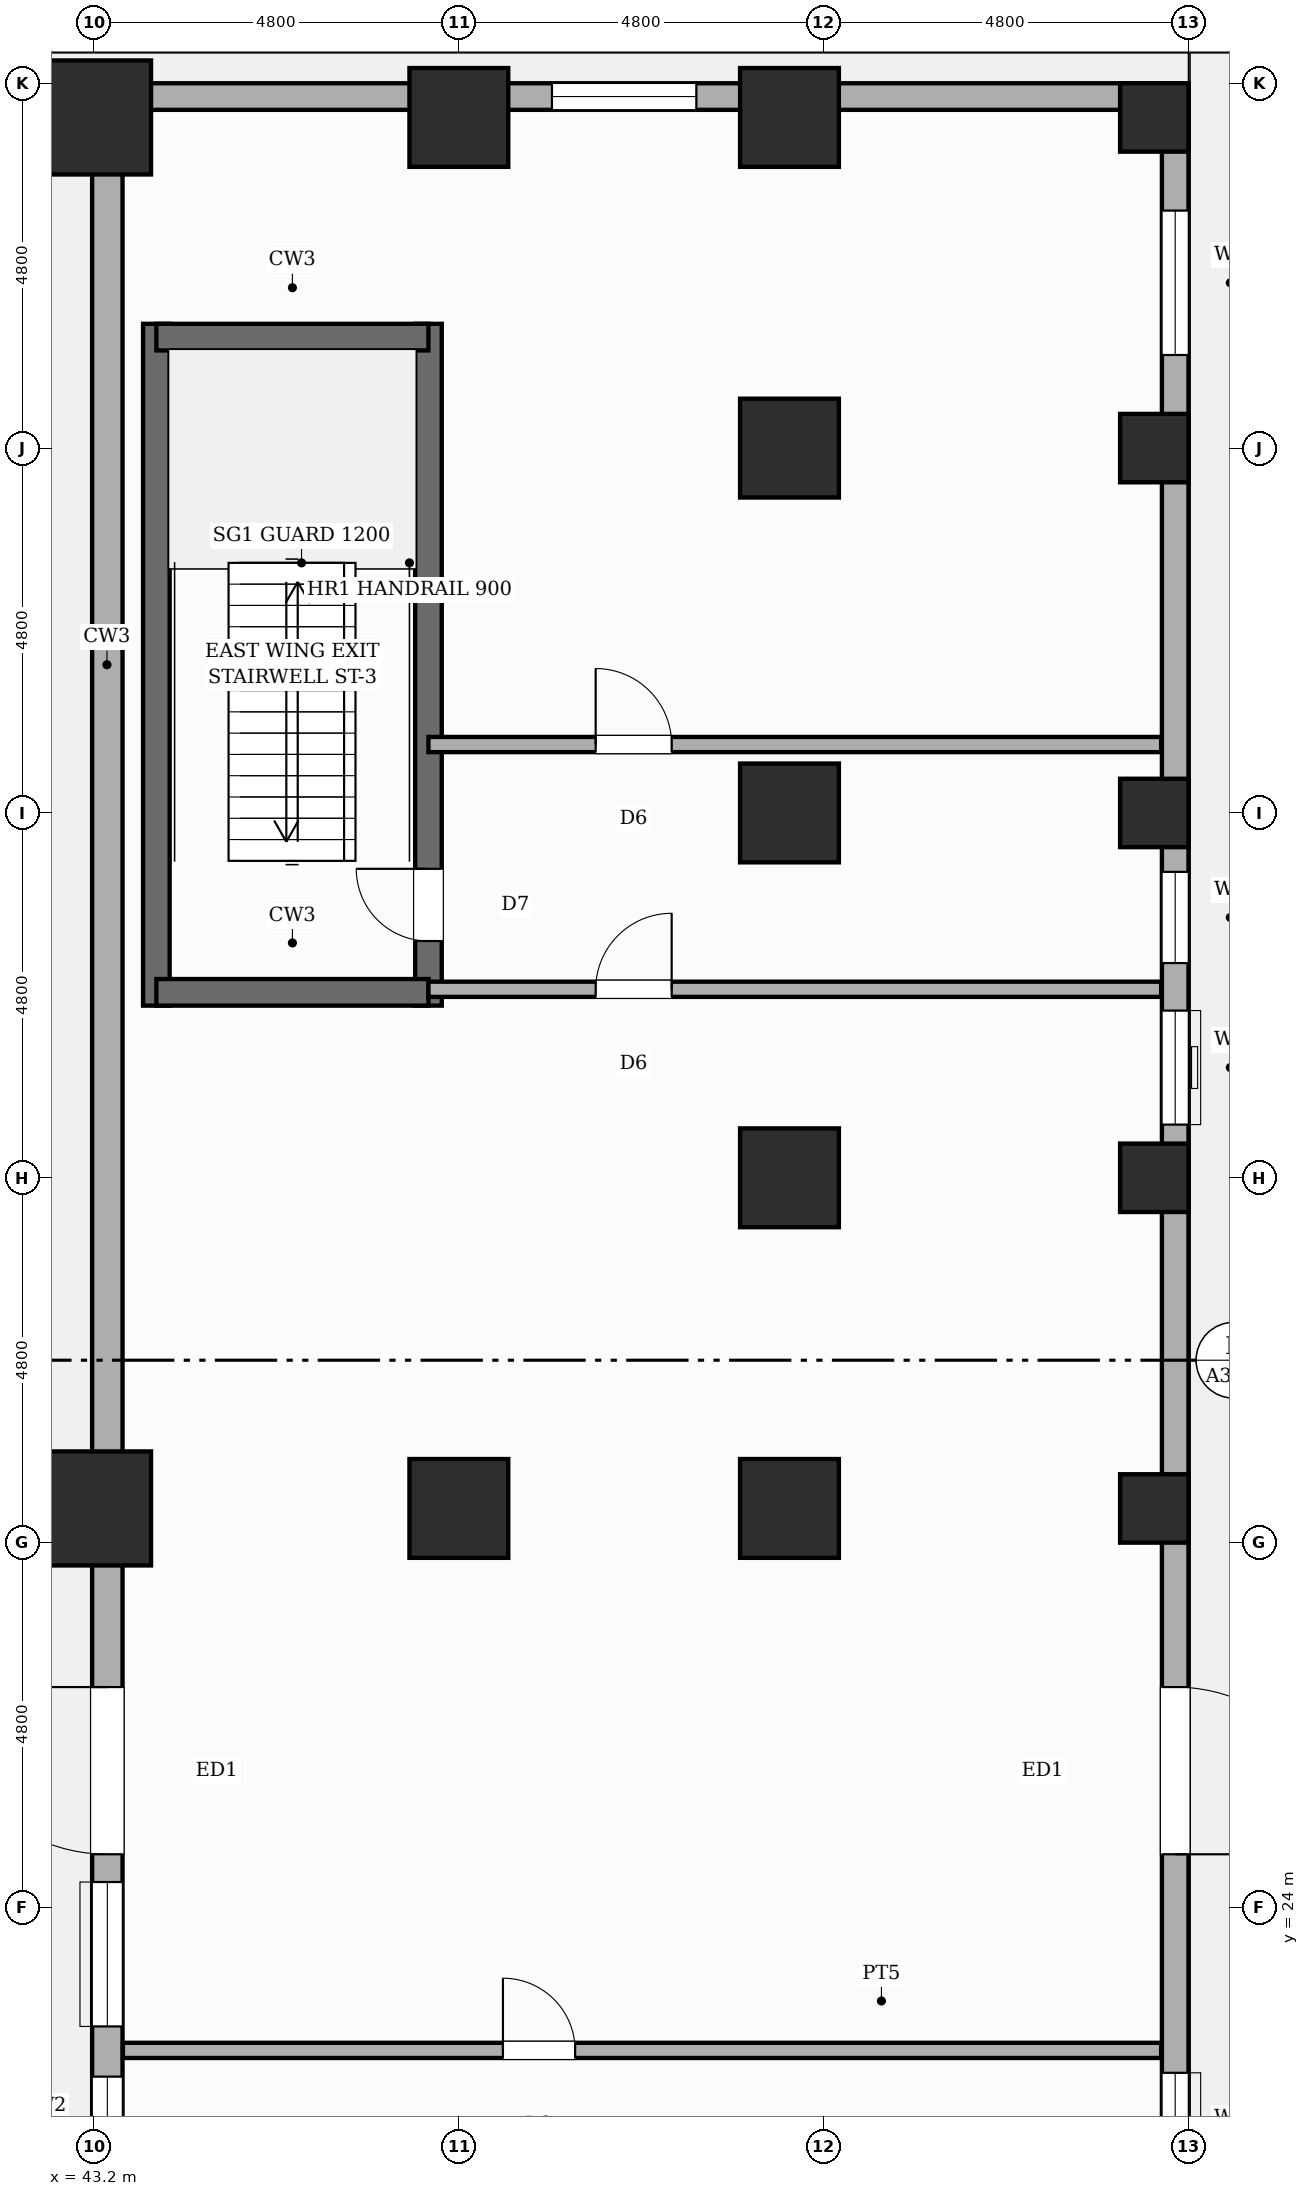
"""IFC4 building model, lengths in metres.
Left out: names, types, materials, properties, quantities, classifications, styles, units other than length and angle.
Written with IfcOpenShell. Run it as: python <this file> out.ifc"""

import sys

from ifc_helpers import new_model, si_unit, direction, frame, frame_2d, origin, origin_2d, place, context, subcontext, project, spatial, rectangle, circle, extrude, element, fill, save


model = new_model("IFC4")
c1 = context("Model", 3, precision=1e-05, world=origin(), true_north=direction((0.0, 1.0)))
c2 = subcontext(c1, "Body", "Model", "MODEL_VIEW")
j1 = project(units=[si_unit("LENGTHUNIT", "METRE"), si_unit("PLANEANGLEUNIT", "RADIAN")], contexts=[c1])
p1 = place(None, origin())
s1 = spatial("IfcSite", under=j1, at=p1, CompositionType="ELEMENT")
p2 = place(p1, origin())
s2 = spatial("IfcBuilding", under=s1, at=p2, CompositionType="ELEMENT")
p3 = place(p2, origin())
s3 = spatial("IfcBuildingStorey", under=s2, at=p3, CompositionType="ELEMENT", Elevation=0.0)
p4 = place(p3, frame((44.02, 35.865, 0.0), z_axis=(0.0, 0.0, 1.0), x_axis=(0.0, 1.0, 0.0)))
e1 = element("IfcWall", 1, at=p4, inside=s3, PredefinedType="SHEAR", context=c2, shape_type="SweptSolid", body=[
    extrude(rectangle(XDim=8.97, YDim=0.35, at=frame_2d((4.485, 0.0))), origin(), (0.0, 0.0, 1.0), 5.2),
])
p5 = place(p3, frame((47.6, 35.865, 0.0), z_axis=(0.0, 0.0, 1.0), x_axis=(0.0, 1.0, 0.0)))
e2 = element("IfcWall", 2, at=p5, inside=s3, PredefinedType="SHEAR", context=c2, shape_type="SweptSolid", body=[
    extrude(rectangle(XDim=8.97, YDim=0.35, at=frame_2d((4.485, 0.0))), origin(), (0.0, 0.0, 1.0), 5.2),
])
p6 = place(p5, frame((0.85, 0.0, 0.0)))
e3 = element("IfcOpeningElement", 3, at=p6, cuts=e2, PredefinedType="OPENING", context=c2, shape_type="SweptSolid", body=[
    extrude(rectangle(XDim=0.95, YDim=2.1, at=frame_2d((0.475, 1.05))), frame((0.0, 0.185, 0.0), z_axis=(0.0, -1.0, 0.0), x_axis=(1.0, 0.0, 0.0)), (0.0, 0.0, 1.0), 0.37),
])
for number, where, z_axis, x_axis in (
    (4, (44.02, 36.04, 0.0), (0.0, 0.0, 1.0), (1.0, 0.0, 0.0)),
    (5, (44.02, 44.66, 0.0), (0.0, 0.0, 1.0), (1.0, 0.0, 0.0)),
):
    element("IfcWall", number, at=place(p3, frame(where, z_axis=z_axis, x_axis=x_axis)), inside=s3, PredefinedType="SHEAR", context=c2, shape_type="SweptSolid", body=[
        extrude(rectangle(XDim=3.58, YDim=0.35, at=frame_2d((1.79, 0.0))), origin(), (0.0, 0.0, 1.0), 5.2),
    ])
for number, where, z_axis, x_axis in (
    (6, (43.2, 29.25, 0.0), (0.0, 0.0, 1.0), (1.0, 0.0, 0.0)),
    (7, (43.2, 47.55, 0.0), (0.0, 0.0, 1.0), (1.0, 0.0, 0.0)),
):
    element("IfcColumn", number, at=place(p3, frame(where, z_axis=z_axis, x_axis=x_axis)), inside=s3, PredefinedType="USERDEFINED", context=c2, shape_type="SweptSolid", body=[
        extrude(rectangle(XDim=1.5, YDim=1.5, at=origin_2d()), origin(), (0.0, 0.0, 1.0), 5.2),
    ])
for number, where, z_axis, x_axis in (
    (8, (48.0, 29.25, 0.0), (0.0, 0.0, 1.0), (1.0, 0.0, 0.0)),
    (9, (48.0, 47.55, 0.0), (0.0, 0.0, 1.0), (1.0, 0.0, 0.0)),
    (10, (52.35, 29.25, 0.0), (0.0, 0.0, 1.0), (1.0, 0.0, 0.0)),
    (11, (52.35, 33.6, 0.0), (0.0, 0.0, 1.0), (1.0, 0.0, 0.0)),
    (12, (52.35, 38.4, 0.0), (0.0, 0.0, 1.0), (1.0, 0.0, 0.0)),
    (13, (52.35, 43.2, 0.0), (0.0, 0.0, 1.0), (1.0, 0.0, 0.0)),
    (14, (52.35, 47.55, 0.0), (0.0, 0.0, 1.0), (1.0, 0.0, 0.0)),
):
    element("IfcColumn", number, at=place(p3, frame(where, z_axis=z_axis, x_axis=x_axis)), inside=s3, PredefinedType="COLUMN", context=c2, shape_type="SweptSolid", body=[
        extrude(rectangle(XDim=1.3, YDim=1.3, at=origin_2d()), origin(), (0.0, 0.0, 1.0), 5.2),
    ])
for number, where, z_axis, x_axis in (
    (15, (57.15, 29.25, 0.0), (0.0, 0.0, 1.0), (1.0, 0.0, 0.0)),
    (16, (57.15, 33.6, 0.0), (0.0, 0.0, 1.0), (1.0, 0.0, 0.0)),
    (17, (57.15, 38.4, 0.0), (0.0, 0.0, 1.0), (1.0, 0.0, 0.0)),
    (18, (57.15, 43.2, 0.0), (0.0, 0.0, 1.0), (1.0, 0.0, 0.0)),
    (19, (57.15, 47.55, 0.0), (0.0, 0.0, 1.0), (1.0, 0.0, 0.0)),
):
    element("IfcColumn", number, at=place(p3, frame(where, z_axis=z_axis, x_axis=x_axis)), inside=s3, PredefinedType="COLUMN", context=c2, shape_type="SweptSolid", body=[
        extrude(circle(Radius=0.45, at=origin_2d()), origin(), (0.0, 0.0, 1.0), 5.2),
    ])
p7 = place(p3, frame((43.2, 47.825, 0.0), z_axis=(0.0, 0.0, 1.0), x_axis=(1.0, 0.0, 0.0)))
e20 = element("IfcWall", 20, at=p7, inside=s3, PredefinedType="STANDARD", context=c2, shape_type="SweptSolid", body=[
    extrude(rectangle(XDim=14.4, YDim=0.35, at=frame_2d((7.2, 0.0))), origin(), (0.0, 0.0, 1.0), 3.97),
])
p8 = place(p7, frame((6.025, 0.0, 0.85)))
e21 = element("IfcOpeningElement", 21, at=p8, cuts=e20, PredefinedType="OPENING", context=c2, shape_type="SweptSolid", body=[
    extrude(rectangle(XDim=1.9, YDim=2.6, at=frame_2d((0.95, 1.3))), frame((0.0, 0.185, 0.0), z_axis=(0.0, -1.0, 0.0), x_axis=(1.0, 0.0, 0.0)), (0.0, 0.0, 1.0), 0.37),
])
p9 = place(p3, frame((57.425, 48.0, 0.0), z_axis=(0.0, 0.0, 1.0), x_axis=(0.0, -1.0, 0.0)))
e22 = element("IfcWall", 22, at=p9, inside=s3, PredefinedType="STANDARD", context=c2, shape_type="SweptSolid", body=[
    extrude(rectangle(XDim=40.2, YDim=0.35, at=frame_2d((20.1, 0.0))), origin(), (0.0, 0.0, 1.0), 3.97),
])
p10 = place(p9, frame((30.5, 0.0, 0.0)))
e23 = element("IfcOpeningElement", 23, at=p10, cuts=e22, PredefinedType="OPENING", context=c2, shape_type="SweptSolid", body=[
    extrude(rectangle(XDim=6.2, YDim=3.4, at=frame_2d((3.1, 1.7))), frame((0.0, 0.185, 0.0), z_axis=(0.0, -1.0, 0.0), x_axis=(1.0, 0.0, 0.0)), (0.0, 0.0, 1.0), 0.37),
])
p11 = place(p9, frame((21.1, 0.0, 0.0)))
e24 = element("IfcOpeningElement", 24, at=p11, cuts=e22, PredefinedType="OPENING", context=c2, shape_type="SweptSolid", body=[
    extrude(rectangle(XDim=2.2, YDim=2.45, at=frame_2d((1.1, 1.225))), frame((0.0, 0.185, 0.0), z_axis=(0.0, -1.0, 0.0), x_axis=(1.0, 0.0, 0.0)), (0.0, 0.0, 1.0), 0.37),
])
p12 = place(p9, frame((12.2, 0.0, 0.85)))
e25 = element("IfcOpeningElement", 25, at=p12, cuts=e22, PredefinedType="OPENING", context=c2, shape_type="SweptSolid", body=[
    extrude(rectangle(XDim=1.5, YDim=2.1, at=frame_2d((0.75, 1.05))), frame((0.0, 0.185, 0.0), z_axis=(0.0, -1.0, 0.0), x_axis=(1.0, 0.0, 0.0)), (0.0, 0.0, 1.0), 0.37),
])
p13 = place(p9, frame((10.375, 0.0, 0.85)))
e26 = element("IfcOpeningElement", 26, at=p13, cuts=e22, PredefinedType="OPENING", context=c2, shape_type="SweptSolid", body=[
    extrude(rectangle(XDim=1.2, YDim=1.8, at=frame_2d((0.6, 0.9))), frame((0.0, 0.185, 0.0), z_axis=(0.0, -1.0, 0.0), x_axis=(1.0, 0.0, 0.0)), (0.0, 0.0, 1.0), 0.37),
])
p14 = place(p9, frame((1.675, 0.0, 0.85)))
e27 = element("IfcOpeningElement", 27, at=p14, cuts=e22, PredefinedType="OPENING", context=c2, shape_type="SweptSolid", body=[
    extrude(rectangle(XDim=1.9, YDim=2.6, at=frame_2d((0.95, 1.3))), frame((0.0, 0.185, 0.0), z_axis=(0.0, -1.0, 0.0), x_axis=(1.0, 0.0, 0.0)), (0.0, 0.0, 1.0), 0.37),
])
p15 = place(p9, frame((26.175, 0.0, 0.85)))
e28 = element("IfcOpeningElement", 28, at=p15, cuts=e22, PredefinedType="OPENING", context=c2, shape_type="SweptSolid", body=[
    extrude(rectangle(XDim=1.9, YDim=2.6, at=frame_2d((0.95, 1.3))), frame((0.0, 0.185, 0.0), z_axis=(0.0, -1.0, 0.0), x_axis=(1.0, 0.0, 0.0)), (0.0, 0.0, 1.0), 0.37),
])
p16 = place(p3, frame((43.375, 17.76, 0.0), z_axis=(0.0, 0.0, 1.0), x_axis=(0.0, 1.0, 0.0)))
e29 = element("IfcWall", 29, at=p16, inside=s3, PredefinedType="SOLIDWALL", context=c2, shape_type="SweptSolid", body=[
    extrude(rectangle(XDim=30.24, YDim=0.4, at=frame_2d((15.12, 0.0))), origin(), (0.0, 0.0, 1.0), 3.97),
])
p17 = place(p16, frame((6.94, 0.0, 0.0)))
e30 = element("IfcOpeningElement", 30, at=p17, cuts=e29, PredefinedType="OPENING", context=c2, shape_type="SweptSolid", body=[
    extrude(rectangle(XDim=2.2, YDim=2.45, at=frame_2d((1.1, 1.225))), frame((0.0, 0.21, 0.0), z_axis=(0.0, -1.0, 0.0), x_axis=(1.0, 0.0, 0.0)), (0.0, 0.0, 1.0), 0.42),
])
p18 = place(p16, frame((4.675, 0.0, 0.85)))
e31 = element("IfcOpeningElement", 31, at=p18, cuts=e29, PredefinedType="OPENING", context=c2, shape_type="SweptSolid", body=[
    extrude(rectangle(XDim=1.9, YDim=2.6, at=frame_2d((0.95, 1.3))), frame((0.0, 0.21, 0.0), z_axis=(0.0, -1.0, 0.0), x_axis=(1.0, 0.0, 0.0)), (0.0, 0.0, 1.0), 0.42),
])
p19 = place(p16, frame((2.515, 0.0, 0.85)))
e32 = element("IfcOpeningElement", 32, at=p19, cuts=e29, PredefinedType="OPENING", context=c2, shape_type="SweptSolid", body=[
    extrude(rectangle(XDim=1.5, YDim=2.1, at=frame_2d((0.75, 1.05))), frame((0.0, 0.21, 0.0), z_axis=(0.0, -1.0, 0.0), x_axis=(1.0, 0.0, 0.0)), (0.0, 0.0, 1.0), 0.42),
])
p20 = place(p3, frame((43.58, 22.12, 0.0), z_axis=(0.0, 0.0, 1.0), x_axis=(1.0, 0.0, 0.0)))
e33 = element("IfcWall", 33, at=p20, inside=s3, PredefinedType="SOLIDWALL", context=c2, shape_type="SweptSolid", body=[
    extrude(rectangle(XDim=13.66, YDim=0.2, at=frame_2d((6.83, 0.0))), origin(), (0.0, 0.0, 1.0), 4.89),
])
p21 = place(p20, frame((5.0, 0.0, 0.0)))
e34 = element("IfcOpeningElement", 34, at=p21, cuts=e33, PredefinedType="OPENING", context=c2, shape_type="SweptSolid", body=[
    extrude(rectangle(XDim=0.95, YDim=2.15, at=frame_2d((0.475, 1.075))), frame((0.0, 0.11, 0.0), z_axis=(0.0, -1.0, 0.0), x_axis=(1.0, 0.0, 0.0)), (0.0, 0.0, 1.0), 0.22),
])
p22 = place(p3, frame((47.6, 36.08, 0.0), z_axis=(0.0, 0.0, 1.0), x_axis=(1.0, 0.0, 0.0)))
e35 = element("IfcWall", 35, at=p22, inside=s3, PredefinedType="PARTITIONING", context=c2, shape_type="SweptSolid", body=[
    extrude(rectangle(XDim=9.64, YDim=0.2, at=frame_2d((4.82, 0.0))), origin(), (0.0, 0.0, 1.0), 4.89),
])
p23 = place(p22, frame((2.2, 0.0, 0.0)))
e36 = element("IfcOpeningElement", 36, at=p23, cuts=e35, PredefinedType="OPENING", context=c2, shape_type="SweptSolid", body=[
    extrude(rectangle(XDim=1.0, YDim=2.15, at=frame_2d((0.5, 1.075))), frame((0.0, 0.11, 0.0), z_axis=(0.0, -1.0, 0.0), x_axis=(1.0, 0.0, 0.0)), (0.0, 0.0, 1.0), 0.22),
])
p24 = place(p3, frame((47.6, 39.3, 0.0), z_axis=(0.0, 0.0, 1.0), x_axis=(1.0, 0.0, 0.0)))
e37 = element("IfcWall", 37, at=p24, inside=s3, PredefinedType="PARTITIONING", context=c2, shape_type="SweptSolid", body=[
    extrude(rectangle(XDim=9.64, YDim=0.2, at=frame_2d((4.82, 0.0))), origin(), (0.0, 0.0, 1.0), 4.89),
])
p25 = place(p24, frame((2.2, 0.0, 0.0)))
e38 = element("IfcOpeningElement", 38, at=p25, cuts=e37, PredefinedType="OPENING", context=c2, shape_type="SweptSolid", body=[
    extrude(rectangle(XDim=1.0, YDim=2.15, at=frame_2d((0.5, 1.075))), frame((0.0, 0.11, 0.0), z_axis=(0.0, -1.0, 0.0), x_axis=(1.0, 0.0, 0.0)), (0.0, 0.0, 1.0), 0.22),
])
p26 = place(p8, origin())
e39 = element("IfcWindow", 39, at=p26, inside=s3, PartitioningType="SINGLE_PANEL", PredefinedType="WINDOW", context=c2, shape_type="SweptSolid", body=[
    extrude(rectangle(XDim=1.9, YDim=2.6, at=frame_2d((0.95, 1.3))), frame((0.0, 0.03, 0.0), z_axis=(0.0, -1.0, 0.0), x_axis=(1.0, 0.0, 0.0)), (0.0, 0.0, 1.0), 0.06),
])
fill(e21, e39)
p27 = place(p11, origin())
e40 = element("IfcDoor", 40, at=p27, inside=s3, OperationType="SINGLE_SWING_RIGHT", PredefinedType="DOOR", context=c2, shape_type="SweptSolid", body=[
    extrude(rectangle(XDim=2.2, YDim=2.45, at=frame_2d((1.1, 1.225))), frame((0.0, 0.025, 0.0), z_axis=(0.0, -1.0, 0.0), x_axis=(1.0, 0.0, 0.0)), (0.0, 0.0, 1.0), 0.05),
])
fill(e24, e40)
p28 = place(p12, origin())
e41 = element("IfcWindow", 41, at=p28, inside=s3, PartitioningType="SINGLE_PANEL", PredefinedType="WINDOW", context=c2, shape_type="SweptSolid", body=[
    extrude(rectangle(XDim=1.5, YDim=2.1, at=frame_2d((0.75, 1.05))), frame((0.0, 0.03, 0.0), z_axis=(0.0, -1.0, 0.0), x_axis=(1.0, 0.0, 0.0)), (0.0, 0.0, 1.0), 0.06),
])
fill(e25, e41)
p29 = place(p13, origin())
e42 = element("IfcWindow", 42, at=p29, inside=s3, PartitioningType="SINGLE_PANEL", PredefinedType="WINDOW", context=c2, shape_type="SweptSolid", body=[
    extrude(rectangle(XDim=1.2, YDim=1.8, at=frame_2d((0.6, 0.9))), frame((0.0, 0.03, 0.0), z_axis=(0.0, -1.0, 0.0), x_axis=(1.0, 0.0, 0.0)), (0.0, 0.0, 1.0), 0.06),
])
fill(e26, e42)
p30 = place(p14, origin())
e43 = element("IfcWindow", 43, at=p30, inside=s3, PartitioningType="SINGLE_PANEL", PredefinedType="WINDOW", context=c2, shape_type="SweptSolid", body=[
    extrude(rectangle(XDim=1.9, YDim=2.6, at=frame_2d((0.95, 1.3))), frame((0.0, 0.03, 0.0), z_axis=(0.0, -1.0, 0.0), x_axis=(1.0, 0.0, 0.0)), (0.0, 0.0, 1.0), 0.06),
])
fill(e27, e43)
p31 = place(p15, origin())
e44 = element("IfcWindow", 44, at=p31, inside=s3, PartitioningType="SINGLE_PANEL", PredefinedType="WINDOW", context=c2, shape_type="SweptSolid", body=[
    extrude(rectangle(XDim=1.9, YDim=2.6, at=frame_2d((0.95, 1.3))), frame((0.0, 0.03, 0.0), z_axis=(0.0, -1.0, 0.0), x_axis=(1.0, 0.0, 0.0)), (0.0, 0.0, 1.0), 0.06),
])
fill(e28, e44)
p32 = place(p17, origin())
e45 = element("IfcDoor", 45, at=p32, inside=s3, OperationType="SINGLE_SWING_RIGHT", PredefinedType="DOOR", context=c2, shape_type="SweptSolid", body=[
    extrude(rectangle(XDim=2.2, YDim=2.45, at=frame_2d((1.1, 1.225))), frame((0.0, 0.025, 0.0), z_axis=(0.0, -1.0, 0.0), x_axis=(1.0, 0.0, 0.0)), (0.0, 0.0, 1.0), 0.05),
])
fill(e30, e45)
p33 = place(p18, origin())
e46 = element("IfcWindow", 46, at=p33, inside=s3, PartitioningType="SINGLE_PANEL", PredefinedType="WINDOW", context=c2, shape_type="SweptSolid", body=[
    extrude(rectangle(XDim=1.9, YDim=2.6, at=frame_2d((0.95, 1.3))), frame((0.0, 0.03, 0.0), z_axis=(0.0, -1.0, 0.0), x_axis=(1.0, 0.0, 0.0)), (0.0, 0.0, 1.0), 0.06),
])
fill(e31, e46)
p34 = place(p19, origin())
e47 = element("IfcWindow", 47, at=p34, inside=s3, PartitioningType="SINGLE_PANEL", PredefinedType="WINDOW", context=c2, shape_type="SweptSolid", body=[
    extrude(rectangle(XDim=1.5, YDim=2.1, at=frame_2d((0.75, 1.05))), frame((0.0, 0.03, 0.0), z_axis=(0.0, -1.0, 0.0), x_axis=(1.0, 0.0, 0.0)), (0.0, 0.0, 1.0), 0.06),
])
fill(e32, e47)
p35 = place(p6, origin())
e48 = element("IfcDoor", 48, at=p35, inside=s3, OperationType="SINGLE_SWING_RIGHT", PredefinedType="DOOR", context=c2, shape_type="SweptSolid", body=[
    extrude(rectangle(XDim=0.95, YDim=2.1, at=frame_2d((0.475, 1.05))), frame((0.0, 0.025, 0.0), z_axis=(0.0, -1.0, 0.0), x_axis=(1.0, 0.0, 0.0)), (0.0, 0.0, 1.0), 0.05),
])
fill(e3, e48)
p36 = place(p21, origin())
e49 = element("IfcDoor", 49, at=p36, inside=s3, OperationType="SINGLE_SWING_LEFT", PredefinedType="DOOR", context=c2, shape_type="SweptSolid", body=[
    extrude(rectangle(XDim=0.95, YDim=2.15, at=frame_2d((0.475, 1.075))), frame((0.0, 0.025, 0.0), z_axis=(0.0, -1.0, 0.0), x_axis=(1.0, 0.0, 0.0)), (0.0, 0.0, 1.0), 0.05),
])
fill(e34, e49)
p37 = place(p23, origin())
e50 = element("IfcDoor", 50, at=p37, inside=s3, OperationType="SINGLE_SWING_RIGHT", PredefinedType="DOOR", context=c2, shape_type="SweptSolid", body=[
    extrude(rectangle(XDim=1.0, YDim=2.15, at=frame_2d((0.5, 1.075))), frame((0.0, 0.025, 0.0), z_axis=(0.0, -1.0, 0.0), x_axis=(1.0, 0.0, 0.0)), (0.0, 0.0, 1.0), 0.05),
])
fill(e36, e50)
p38 = place(p25, origin())
e51 = element("IfcDoor", 51, at=p38, inside=s3, OperationType="SINGLE_SWING_LEFT", PredefinedType="DOOR", context=c2, shape_type="SweptSolid", body=[
    extrude(rectangle(XDim=1.0, YDim=2.15, at=frame_2d((0.5, 1.075))), frame((0.0, 0.025, 0.0), z_axis=(0.0, -1.0, 0.0), x_axis=(1.0, 0.0, 0.0)), (0.0, 0.0, 1.0), 0.05),
])
fill(e38, e51)
save(model, sys.argv[1])
